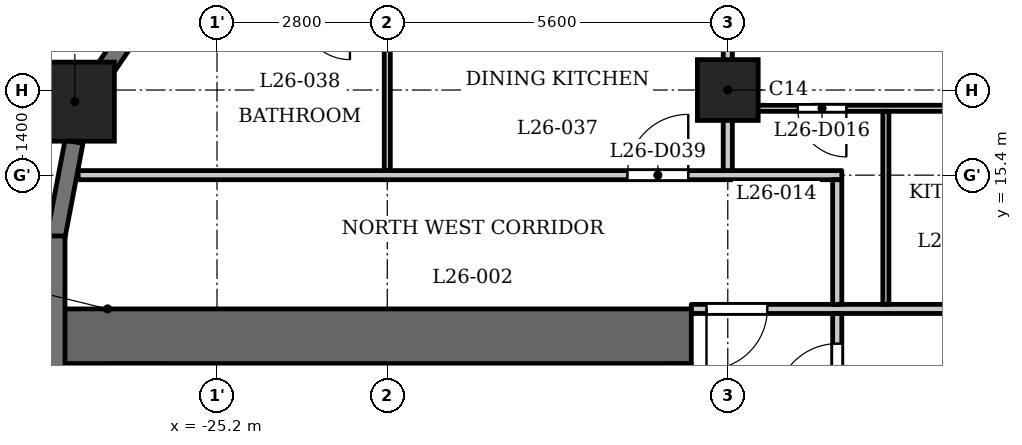
"""IFC4 building model, lengths in metres.
Left out: names, types, materials, properties, quantities, classifications, styles, units other than length and angle.
Written with IfcOpenShell. Run it as: python <this file> out.ifc"""

import sys

from ifc_helpers import new_model, si_unit, direction, frame, frame_2d, origin, origin_2d, place, context, subcontext, project, spatial, rectangle, extrude, element, fill, save


model = new_model("IFC4")
c1 = context("Model", 3, precision=1e-05, world=origin(), true_north=direction((0.0, 1.0)))
c2 = subcontext(c1, "Body", "Model", "MODEL_VIEW")
j1 = project(units=[si_unit("LENGTHUNIT", "METRE"), si_unit("PLANEANGLEUNIT", "RADIAN")], contexts=[c1])
p1 = place(None, origin())
s1 = spatial("IfcSite", under=j1, at=p1, CompositionType="ELEMENT")
p2 = place(p1, origin())
s2 = spatial("IfcBuilding", under=s1, at=p2, CompositionType="ELEMENT")
p3 = place(p2, frame((0.0, 0.0, 104.3)))
s3 = spatial("IfcBuildingStorey", under=s2, at=p3, CompositionType="ELEMENT", Elevation=104.3)
p4 = place(p3, frame((-27.538, 16.609, 0.0), z_axis=(0.0, 0.0, 1.0), x_axis=(1.0, 0.0, 0.0)))
e1 = element("IfcColumn", 1, at=p4, inside=s3, PredefinedType="COLUMN", context=c2, shape_type="SweptSolid", body=[
    extrude(rectangle(XDim=1.3, YDim=1.3, at=origin_2d()), origin(), (0.0, 0.0, 1.0), 3.5),
])
p5 = place(p3, frame((-16.8, 16.8, 0.0), z_axis=(0.0, 0.0, 1.0), x_axis=(1.0, 0.0, 0.0)))
e2 = element("IfcColumn", 2, at=p5, inside=s3, PredefinedType="COLUMN", context=c2, shape_type="SweptSolid", body=[
    extrude(rectangle(XDim=1.0, YDim=1.0, at=origin_2d()), origin(), (0.0, 0.0, 1.0), 3.5),
])
p6 = place(p3, frame((-26.589, 17.81, 0.0), z_axis=(0.0, 0.0, 1.0), x_axis=(-0.562066330934, -0.827092159091, 0.0)))
e3 = element("IfcWall", 3, at=p6, inside=s3, PredefinedType="SOLIDWALL", context=c2, shape_type="SweptSolid", body=[
    extrude(rectangle(XDim=0.877, YDim=0.3, at=frame_2d((0.438, 0.0))), origin(), (0.0, 0.0, 1.0), 3.2),
])
p7 = place(p3, frame((-27.552, 15.949, 0.0), z_axis=(0.0, 0.0, 1.0), x_axis=(-0.187279751651, -0.982306619453, 0.0)))
e4 = element("IfcWall", 4, at=p7, inside=s3, PredefinedType="SOLIDWALL", context=c2, shape_type="SweptSolid", body=[
    extrude(rectangle(XDim=1.606, YDim=0.3, at=frame_2d((0.803, 0.0))), origin(), (0.0, 0.0, 1.0), 2.4),
])
p8 = place(p3, frame((-27.85, 14.4, 0.0), z_axis=(0.0, 0.0, 1.0), x_axis=(0.0, -1.0, 0.0)))
e5 = element("IfcWall", 5, at=p8, inside=s3, PredefinedType="SOLIDWALL", context=c2, shape_type="SweptSolid", body=[
    extrude(rectangle(XDim=2.55, YDim=0.3, at=frame_2d((1.275, 0.0))), origin(), (0.0, 0.0, 1.0), 2.4),
])
p9 = place(p3, frame((-17.4, 12.75, 0.0), z_axis=(0.0, 0.0, 1.0), x_axis=(-1.0, 0.0, 0.0)))
e6 = element("IfcWall", 6, at=p9, inside=s3, PredefinedType="SHEAR", context=c2, shape_type="SweptSolid", body=[
    extrude(rectangle(XDim=10.4, YDim=0.9, at=frame_2d((5.2, 0.0))), origin(), (0.0, 0.0, 1.0), 3.2),
])
p10 = place(p3, frame((-17.6, -12.3, 0.0), z_axis=(0.0, 0.0, 1.0), x_axis=(0.0, 1.0, 0.0)))
e7 = element("IfcWall", 7, at=p10, inside=s3, PredefinedType="SHEAR", context=c2, shape_type="SweptSolid", body=[
    extrude(rectangle(XDim=24.6, YDim=0.4, at=frame_2d((12.3, 0.0))), origin(), (0.0, 0.0, 1.0), 3.2),
])
p11 = place(p10, frame((6.0, 0.0, 0.0)))
e8 = element("IfcOpeningElement", 8, at=p11, cuts=e7, PredefinedType="OPENING", context=c2, shape_type="SweptSolid", body=[
    extrude(rectangle(XDim=1.1, YDim=2.1, at=frame_2d((0.55, 1.05))), frame((0.0, 0.21, 0.0), z_axis=(0.0, -1.0, 0.0), x_axis=(1.0, 0.0, 0.0)), (0.0, 0.0, 1.0), 0.42),
])
p12 = place(p10, frame((8.4, 0.0, 0.0)))
e9 = element("IfcOpeningElement", 9, at=p12, cuts=e7, PredefinedType="OPENING", context=c2, shape_type="SweptSolid", body=[
    extrude(rectangle(XDim=1.1, YDim=2.1, at=frame_2d((0.55, 1.05))), frame((0.0, 0.21, 0.0), z_axis=(0.0, -1.0, 0.0), x_axis=(1.0, 0.0, 0.0)), (0.0, 0.0, 1.0), 0.42),
])
p13 = place(p10, frame((10.8, 0.0, 0.0)))
e10 = element("IfcOpeningElement", 10, at=p13, cuts=e7, PredefinedType="OPENING", context=c2, shape_type="SweptSolid", body=[
    extrude(rectangle(XDim=1.1, YDim=2.1, at=frame_2d((0.55, 1.05))), frame((0.0, 0.21, 0.0), z_axis=(0.0, -1.0, 0.0), x_axis=(1.0, 0.0, 0.0)), (0.0, 0.0, 1.0), 0.42),
])
p14 = place(p10, frame((16.75, 0.0, 0.0)))
e11 = element("IfcOpeningElement", 11, at=p14, cuts=e7, PredefinedType="OPENING", context=c2, shape_type="SweptSolid", body=[
    extrude(rectangle(XDim=0.9, YDim=2.1, at=frame_2d((0.45, 1.05))), frame((0.0, 0.21, 0.0), z_axis=(0.0, -1.0, 0.0), x_axis=(1.0, 0.0, 0.0)), (0.0, 0.0, 1.0), 0.42),
])
p15 = place(p10, frame((22.8, 0.0, 0.0)))
e12 = element("IfcOpeningElement", 12, at=p15, cuts=e7, PredefinedType="OPENING", context=c2, shape_type="SweptSolid", body=[
    extrude(rectangle(XDim=1.1, YDim=2.1, at=frame_2d((0.55, 1.05))), frame((0.0, 0.21, 0.0), z_axis=(0.0, -1.0, 0.0), x_axis=(1.0, 0.0, 0.0)), (0.0, 0.0, 1.0), 0.42),
])
p16 = place(p10, frame((0.7, 0.0, 0.0)))
e13 = element("IfcOpeningElement", 13, at=p16, cuts=e7, PredefinedType="OPENING", context=c2, shape_type="SweptSolid", body=[
    extrude(rectangle(XDim=1.1, YDim=2.1, at=frame_2d((0.55, 1.05))), frame((0.0, 0.21, 0.0), z_axis=(0.0, -1.0, 0.0), x_axis=(1.0, 0.0, 0.0)), (0.0, 0.0, 1.0), 0.42),
])
p17 = place(p10, frame((12.775, 0.0, 0.0)))
e14 = element("IfcOpeningElement", 14, at=p17, cuts=e7, PredefinedType="OPENING", context=c2, shape_type="SweptSolid", body=[
    extrude(rectangle(XDim=1.8, YDim=2.1, at=frame_2d((0.9, 1.05))), frame((0.0, 0.21, 0.0), z_axis=(0.0, -1.0, 0.0), x_axis=(1.0, 0.0, 0.0)), (0.0, 0.0, 1.0), 0.42),
])
p18 = place(p3, frame((-26.55, -12.3, 0.0), z_axis=(0.0, 0.0, 1.0), x_axis=(0.0, 1.0, 0.0)))
e15 = element("IfcWall", 15, at=p18, inside=s3, PredefinedType="SHEAR", context=c2, shape_type="SweptSolid", body=[
    extrude(rectangle(XDim=24.6, YDim=0.9, at=frame_2d((12.3, 0.0))), origin(), (0.0, 0.0, 1.0), 3.2),
])
p19 = place(p3, frame((-23.55, 9.8, 0.0), z_axis=(0.0, 0.0, 1.0), x_axis=(0.0, 1.0, 0.0)))
e16 = element("IfcWall", 16, at=p19, inside=s3, PredefinedType="PARTITIONING", context=c2, shape_type="SweptSolid", body=[
    extrude(rectangle(XDim=2.5, YDim=0.2, at=frame_2d((1.25, 0.0))), origin(), (0.0, 0.0, 1.0), 3.2),
])
p20 = place(p19, frame((0.8, 0.0, 0.0)))
e17 = element("IfcOpeningElement", 17, at=p20, cuts=e16, PredefinedType="OPENING", context=c2, shape_type="SweptSolid", body=[
    extrude(rectangle(XDim=0.9, YDim=2.1, at=frame_2d((0.45, 1.05))), frame((0.0, 0.11, 0.0), z_axis=(0.0, -1.0, 0.0), x_axis=(1.0, 0.0, 0.0)), (0.0, 0.0, 1.0), 0.22),
])
p21 = place(p3, frame((-17.4, 13.2, 0.0), z_axis=(0.0, 0.0, 1.0), x_axis=(1.0, 0.0, 0.0)))
e18 = element("IfcWall", 18, at=p21, inside=s3, PredefinedType="PARTITIONING", context=c2, shape_type="SweptSolid", body=[
    extrude(rectangle(XDim=34.8, YDim=0.15, at=frame_2d((17.4, 0.0))), origin(), (0.0, 0.0, 1.0), 3.2),
])
p22 = place(p21, frame((0.25, 0.0, 0.0)))
e19 = element("IfcOpeningElement", 19, at=p22, cuts=e18, PredefinedType="OPENING", context=c2, shape_type="SweptSolid", body=[
    extrude(rectangle(XDim=1.0, YDim=2.1, at=frame_2d((0.5, 1.05))), frame((0.0, 0.085, 0.0), z_axis=(0.0, -1.0, 0.0), x_axis=(1.0, 0.0, 0.0)), (0.0, 0.0, 1.0), 0.17),
])
p23 = place(p21, frame((33.65, 0.0, 0.0)))
e20 = element("IfcOpeningElement", 20, at=p23, cuts=e18, PredefinedType="OPENING", context=c2, shape_type="SweptSolid", body=[
    extrude(rectangle(XDim=1.0, YDim=2.1, at=frame_2d((0.5, 1.05))), frame((0.0, 0.085, 0.0), z_axis=(0.0, -1.0, 0.0), x_axis=(1.0, 0.0, 0.0)), (0.0, 0.0, 1.0), 0.17),
])
p24 = place(p21, frame((4.55, 0.0, 0.0)))
e21 = element("IfcOpeningElement", 21, at=p24, cuts=e18, PredefinedType="OPENING", context=c2, shape_type="SweptSolid", body=[
    extrude(rectangle(XDim=1.0, YDim=2.1, at=frame_2d((0.5, 1.05))), frame((0.0, 0.085, 0.0), z_axis=(0.0, -1.0, 0.0), x_axis=(1.0, 0.0, 0.0)), (0.0, 0.0, 1.0), 0.17),
])
p25 = place(p21, frame((6.85, 0.0, 0.0)))
e22 = element("IfcOpeningElement", 22, at=p25, cuts=e18, PredefinedType="OPENING", context=c2, shape_type="SweptSolid", body=[
    extrude(rectangle(XDim=1.0, YDim=2.1, at=frame_2d((0.5, 1.05))), frame((0.0, 0.085, 0.0), z_axis=(0.0, -1.0, 0.0), x_axis=(1.0, 0.0, 0.0)), (0.0, 0.0, 1.0), 0.17),
])
p26 = place(p21, frame((12.5, 0.0, 0.0)))
e23 = element("IfcOpeningElement", 23, at=p26, cuts=e18, PredefinedType="OPENING", context=c2, shape_type="SweptSolid", body=[
    extrude(rectangle(XDim=1.0, YDim=2.1, at=frame_2d((0.5, 1.05))), frame((0.0, 0.085, 0.0), z_axis=(0.0, -1.0, 0.0), x_axis=(1.0, 0.0, 0.0)), (0.0, 0.0, 1.0), 0.17),
])
p27 = place(p21, frame((25.7, 0.0, 0.0)))
e24 = element("IfcOpeningElement", 24, at=p27, cuts=e18, PredefinedType="OPENING", context=c2, shape_type="SweptSolid", body=[
    extrude(rectangle(XDim=1.0, YDim=2.1, at=frame_2d((0.5, 1.05))), frame((0.0, 0.085, 0.0), z_axis=(0.0, -1.0, 0.0), x_axis=(1.0, 0.0, 0.0)), (0.0, 0.0, 1.0), 0.17),
])
p28 = place(p21, frame((29.75, 0.0, 0.0)))
e25 = element("IfcOpeningElement", 25, at=p28, cuts=e18, PredefinedType="OPENING", context=c2, shape_type="SweptSolid", body=[
    extrude(rectangle(XDim=1.0, YDim=2.1, at=frame_2d((0.5, 1.05))), frame((0.0, 0.085, 0.0), z_axis=(0.0, -1.0, 0.0), x_axis=(1.0, 0.0, 0.0)), (0.0, 0.0, 1.0), 0.17),
])
p29 = place(p3, frame((-27.484, 15.4, 0.0), z_axis=(0.0, 0.0, 1.0), x_axis=(1.0, 0.0, 0.0)))
e26 = element("IfcWall", 26, at=p29, inside=s3, PredefinedType="PARTITIONING", context=c2, shape_type="SweptSolid", body=[
    extrude(rectangle(XDim=12.559, YDim=0.15, at=frame_2d((6.279, 0.0))), origin(), (0.0, 0.0, 1.0), 3.2),
])
p30 = place(p29, frame((9.034, 0.0, 0.0)))
e27 = element("IfcOpeningElement", 27, at=p30, cuts=e26, PredefinedType="OPENING", context=c2, shape_type="SweptSolid", body=[
    extrude(rectangle(XDim=1.0, YDim=2.1, at=frame_2d((0.5, 1.05))), frame((0.0, 0.085, 0.0), z_axis=(0.0, -1.0, 0.0), x_axis=(1.0, 0.0, 0.0)), (0.0, 0.0, 1.0), 0.17),
])
p31 = place(p3, frame((-16.725, 16.5, 0.0), z_axis=(0.0, 0.0, 1.0), x_axis=(1.0, 0.0, 0.0)))
e28 = element("IfcWall", 28, at=p31, inside=s3, PredefinedType="PARTITIONING", context=c2, shape_type="SweptSolid", body=[
    extrude(rectangle(XDim=33.45, YDim=0.1, at=frame_2d((16.725, 0.0))), origin(), (0.0, 0.0, 1.0), 3.2),
])
p32 = place(p31, frame((1.075, 0.0, 0.0)))
e29 = element("IfcOpeningElement", 29, at=p32, cuts=e28, PredefinedType="OPENING", context=c2, shape_type="SweptSolid", body=[
    extrude(rectangle(XDim=0.8, YDim=2.1, at=frame_2d((0.4, 1.05))), frame((0.0, 0.06, 0.0), z_axis=(0.0, -1.0, 0.0), x_axis=(1.0, 0.0, 0.0)), (0.0, 0.0, 1.0), 0.12),
])
p33 = place(p31, frame((3.975, 0.0, 0.0)))
e30 = element("IfcOpeningElement", 30, at=p33, cuts=e28, PredefinedType="OPENING", context=c2, shape_type="SweptSolid", body=[
    extrude(rectangle(XDim=0.9, YDim=2.1, at=frame_2d((0.45, 1.05))), frame((0.0, 0.06, 0.0), z_axis=(0.0, -1.0, 0.0), x_axis=(1.0, 0.0, 0.0)), (0.0, 0.0, 1.0), 0.12),
])
p34 = place(p31, frame((8.975, 0.0, 0.0)))
e31 = element("IfcOpeningElement", 31, at=p34, cuts=e28, PredefinedType="OPENING", context=c2, shape_type="SweptSolid", body=[
    extrude(rectangle(XDim=0.8, YDim=2.1, at=frame_2d((0.4, 1.05))), frame((0.0, 0.06, 0.0), z_axis=(0.0, -1.0, 0.0), x_axis=(1.0, 0.0, 0.0)), (0.0, 0.0, 1.0), 0.12),
])
p35 = place(p31, frame((6.325, 0.0, 0.0)))
e32 = element("IfcOpeningElement", 32, at=p35, cuts=e28, PredefinedType="OPENING", context=c2, shape_type="SweptSolid", body=[
    extrude(rectangle(XDim=0.9, YDim=2.1, at=frame_2d((0.45, 1.05))), frame((0.0, 0.06, 0.0), z_axis=(0.0, -1.0, 0.0), x_axis=(1.0, 0.0, 0.0)), (0.0, 0.0, 1.0), 0.12),
])
p36 = place(p31, frame((20.725, 0.0, 0.0)))
e33 = element("IfcOpeningElement", 33, at=p36, cuts=e28, PredefinedType="OPENING", context=c2, shape_type="SweptSolid", body=[
    extrude(rectangle(XDim=0.8, YDim=2.1, at=frame_2d((0.4, 1.05))), frame((0.0, 0.06, 0.0), z_axis=(0.0, -1.0, 0.0), x_axis=(1.0, 0.0, 0.0)), (0.0, 0.0, 1.0), 0.12),
])
p37 = place(p31, frame((17.775, 0.0, 0.0)))
e34 = element("IfcOpeningElement", 34, at=p37, cuts=e28, PredefinedType="OPENING", context=c2, shape_type="SweptSolid", body=[
    extrude(rectangle(XDim=0.9, YDim=2.1, at=frame_2d((0.45, 1.05))), frame((0.0, 0.06, 0.0), z_axis=(0.0, -1.0, 0.0), x_axis=(1.0, 0.0, 0.0)), (0.0, 0.0, 1.0), 0.12),
])
p38 = place(p31, frame((11.825, 0.0, 0.0)))
e35 = element("IfcOpeningElement", 35, at=p38, cuts=e28, PredefinedType="OPENING", context=c2, shape_type="SweptSolid", body=[
    extrude(rectangle(XDim=0.9, YDim=2.1, at=frame_2d((0.45, 1.05))), frame((0.0, 0.06, 0.0), z_axis=(0.0, -1.0, 0.0), x_axis=(1.0, 0.0, 0.0)), (0.0, 0.0, 1.0), 0.12),
])
p39 = place(p31, frame((15.175, 0.0, 0.0)))
e36 = element("IfcOpeningElement", 36, at=p39, cuts=e28, PredefinedType="OPENING", context=c2, shape_type="SweptSolid", body=[
    extrude(rectangle(XDim=0.9, YDim=2.1, at=frame_2d((0.45, 1.05))), frame((0.0, 0.06, 0.0), z_axis=(0.0, -1.0, 0.0), x_axis=(1.0, 0.0, 0.0)), (0.0, 0.0, 1.0), 0.12),
])
p40 = place(p31, frame((22.975, 0.0, 0.0)))
e37 = element("IfcOpeningElement", 37, at=p40, cuts=e28, PredefinedType="OPENING", context=c2, shape_type="SweptSolid", body=[
    extrude(rectangle(XDim=0.8, YDim=2.1, at=frame_2d((0.4, 1.05))), frame((0.0, 0.06, 0.0), z_axis=(0.0, -1.0, 0.0), x_axis=(1.0, 0.0, 0.0)), (0.0, 0.0, 1.0), 0.12),
])
p41 = place(p31, frame((24.875, 0.0, 0.0)))
e38 = element("IfcOpeningElement", 38, at=p41, cuts=e28, PredefinedType="OPENING", context=c2, shape_type="SweptSolid", body=[
    extrude(rectangle(XDim=0.9, YDim=2.1, at=frame_2d((0.45, 1.05))), frame((0.0, 0.06, 0.0), z_axis=(0.0, -1.0, 0.0), x_axis=(1.0, 0.0, 0.0)), (0.0, 0.0, 1.0), 0.12),
])
p42 = place(p31, frame((32.075, 0.0, 0.0)))
e39 = element("IfcOpeningElement", 39, at=p42, cuts=e28, PredefinedType="OPENING", context=c2, shape_type="SweptSolid", body=[
    extrude(rectangle(XDim=0.8, YDim=2.1, at=frame_2d((0.4, 1.05))), frame((0.0, 0.06, 0.0), z_axis=(0.0, -1.0, 0.0), x_axis=(1.0, 0.0, 0.0)), (0.0, 0.0, 1.0), 0.12),
])
p43 = place(p31, frame((29.175, 0.0, 0.0)))
e40 = element("IfcOpeningElement", 40, at=p43, cuts=e28, PredefinedType="OPENING", context=c2, shape_type="SweptSolid", body=[
    extrude(rectangle(XDim=0.9, YDim=2.1, at=frame_2d((0.45, 1.05))), frame((0.0, 0.06, 0.0), z_axis=(0.0, -1.0, 0.0), x_axis=(1.0, 0.0, 0.0)), (0.0, 0.0, 1.0), 0.12),
])
p44 = place(p3, frame((-22.4, 15.475, 0.0), z_axis=(0.0, 0.0, 1.0), x_axis=(0.0, 1.0, 0.0)))
e41 = element("IfcWall", 41, at=p44, inside=s3, PredefinedType="PARTITIONING", context=c2, shape_type="SweptSolid", body=[
    extrude(rectangle(XDim=2.575, YDim=0.1, at=frame_2d((1.288, 0.0))), origin(), (0.0, 0.0, 1.0), 3.2),
])
p45 = place(p3, frame((-16.8, 15.475, 0.0), z_axis=(0.0, 0.0, 1.0), x_axis=(0.0, 1.0, 0.0)))
e42 = element("IfcWall", 42, at=p45, inside=s3, PredefinedType="PARTITIONING", context=c2, shape_type="SweptSolid", body=[
    extrude(rectangle(XDim=7.555, YDim=0.15, at=frame_2d((3.777, 0.0))), origin(), (0.0, 0.0, 1.0), 3.2),
])
p46 = place(p3, frame((-15.0, 6.769, 0.0), z_axis=(0.0, 0.0, 1.0), x_axis=(0.0, 1.0, 0.0)))
e43 = element("IfcWall", 43, at=p46, inside=s3, PredefinedType="PARTITIONING", context=c2, shape_type="SweptSolid", body=[
    extrude(rectangle(XDim=6.356, YDim=0.15, at=frame_2d((3.178, 0.0))), origin(), (0.0, 0.0, 1.0), 3.2),
])
p47 = place(p46, frame((4.86, 0.0, 0.0)))
e44 = element("IfcOpeningElement", 44, at=p47, cuts=e43, PredefinedType="OPENING", context=c2, shape_type="SweptSolid", body=[
    extrude(rectangle(XDim=1.0, YDim=2.1, at=frame_2d((0.5, 1.05))), frame((0.0, 0.085, 0.0), z_axis=(0.0, -1.0, 0.0), x_axis=(1.0, 0.0, 0.0)), (0.0, 0.0, 1.0), 0.17),
])
p48 = place(p3, frame((-15.0, 13.275, 0.0), z_axis=(0.0, 0.0, 1.0), x_axis=(0.0, 1.0, 0.0)))
e45 = element("IfcWall", 45, at=p48, inside=s3, PredefinedType="PARTITIONING", context=c2, shape_type="SweptSolid", body=[
    extrude(rectangle(XDim=2.05, YDim=0.15, at=frame_2d((1.025, 0.0))), origin(), (0.0, 0.0, 1.0), 3.2),
])
p49 = place(p3, frame((-14.2, 13.275, 0.0), z_axis=(0.0, 0.0, 1.0), x_axis=(0.0, 1.0, 0.0)))
e46 = element("IfcWall", 46, at=p49, inside=s3, PredefinedType="PARTITIONING", context=c2, shape_type="SweptSolid", body=[
    extrude(rectangle(XDim=3.175, YDim=0.1, at=frame_2d((1.587, 0.0))), origin(), (0.0, 0.0, 1.0), 3.2),
])
p50 = place(p47, origin())
e47 = element("IfcDoor", 47, at=p50, inside=s3, OperationType="SINGLE_SWING_RIGHT", PredefinedType="DOOR", context=c2, shape_type="SweptSolid", body=[
    extrude(rectangle(XDim=1.0, YDim=2.1, at=frame_2d((0.5, 1.05))), frame((0.0, 0.025, 0.0), z_axis=(0.0, -1.0, 0.0), x_axis=(1.0, 0.0, 0.0)), (0.0, 0.0, 1.0), 0.05),
])
fill(e44, e47)
p51 = place(p22, origin())
e48 = element("IfcDoor", 48, at=p51, inside=s3, OperationType="SINGLE_SWING_LEFT", PredefinedType="DOOR", context=c2, shape_type="SweptSolid", body=[
    extrude(rectangle(XDim=1.0, YDim=2.1, at=frame_2d((0.5, 1.05))), frame((0.0, 0.025, 0.0), z_axis=(0.0, -1.0, 0.0), x_axis=(1.0, 0.0, 0.0)), (0.0, 0.0, 1.0), 0.05),
])
fill(e19, e48)
p52 = place(p32, origin())
e49 = element("IfcDoor", 49, at=p52, inside=s3, OperationType="SINGLE_SWING_RIGHT", PredefinedType="DOOR", context=c2, shape_type="SweptSolid", body=[
    extrude(rectangle(XDim=0.8, YDim=2.1, at=frame_2d((0.4, 1.05))), frame((0.0, 0.025, 0.0), z_axis=(0.0, -1.0, 0.0), x_axis=(1.0, 0.0, 0.0)), (0.0, 0.0, 1.0), 0.05),
])
fill(e29, e49)
p53 = place(p30, origin())
e50 = element("IfcDoor", 50, at=p53, inside=s3, OperationType="SINGLE_SWING_LEFT", PredefinedType="DOOR", context=c2, shape_type="SweptSolid", body=[
    extrude(rectangle(XDim=1.0, YDim=2.1, at=frame_2d((0.5, 1.05))), frame((0.0, 0.025, 0.0), z_axis=(0.0, -1.0, 0.0), x_axis=(1.0, 0.0, 0.0)), (0.0, 0.0, 1.0), 0.05),
])
fill(e27, e50)
save(model, sys.argv[1])
